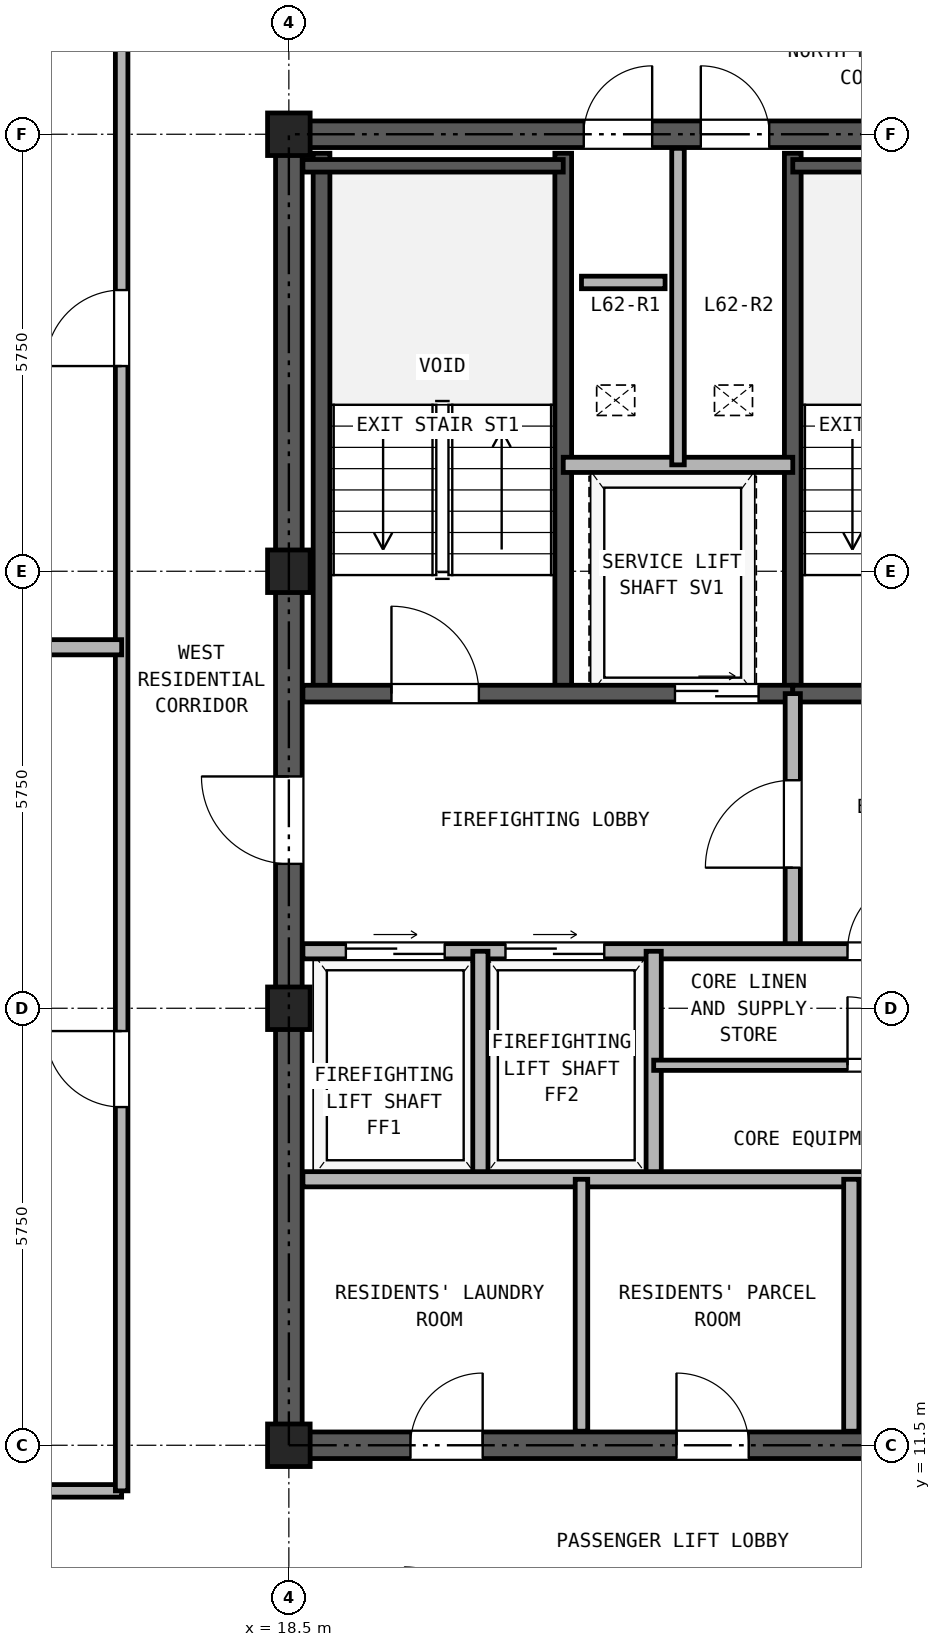
"""IFC4 building model, lengths in metres.
Left out: names, types, materials, properties, quantities, classifications, styles, units other than length and angle.
Written with IfcOpenShell. Run it as: python <this file> out.ifc"""

import sys

from ifc_helpers import new_model, si_unit, direction, frame, frame_2d, origin, origin_2d, place, context, subcontext, project, spatial, rectangle, hollow_rectangle, extrude, source, transform, mapped, element, fill, save


model = new_model("IFC4")
c1 = context("Model", 3, precision=1e-05, world=origin(), true_north=direction((0.0, 1.0)))
c2 = subcontext(c1, "Body", "Model", "MODEL_VIEW")
j1 = project(units=[si_unit("LENGTHUNIT", "METRE"), si_unit("PLANEANGLEUNIT", "RADIAN")], contexts=[c1])
p1 = place(None, origin())
s1 = spatial("IfcSite", under=j1, at=p1, CompositionType="ELEMENT")
p2 = place(p1, origin())
s2 = spatial("IfcBuilding", under=s1, at=p2, CompositionType="ELEMENT")
p3 = place(p2, frame((0.0, 0.0, 220.1)))
s3 = spatial("IfcBuildingStorey", under=s2, at=p3, CompositionType="ELEMENT", Elevation=220.1)
m1 = source(origin(), c2, "Body", "SweptSolid", [
    extrude(hollow_rectangle(XDim=0.56, YDim=0.56, WallThickness=0.03, at=origin_2d()), origin(), (0.0, 0.0, 1.0), 2.98),
])
for number, where, z_axis, x_axis in (
    (1, (18.5, 11.5, 0.0), (0.0, 0.0, 1.0), (1.0, 0.0, 0.0)),
    (2, (18.5, 17.25, 0.0), (0.0, 0.0, 1.0), (1.0, 0.0, 0.0)),
    (3, (18.5, 23.0, 0.0), (0.0, 0.0, 1.0), (1.0, 0.0, 0.0)),
    (4, (18.5, 28.75, 0.0), (0.0, 0.0, 1.0), (1.0, 0.0, 0.0)),
):
    element("IfcColumn", number, at=place(p3, frame(where, z_axis=z_axis, x_axis=x_axis)), inside=s3, PredefinedType="COLUMN", context=c2, shape_type="MappedRepresentation", body=[
        mapped(m1, transform((0.0, 0.0, 0.0), x_axis=(1.0, 0.0, 0.0), y_axis=(0.0, 1.0, 0.0), z_axis=(0.0, 0.0, 1.0), scale=1.0)),
    ])
p4 = place(p3, frame((18.325, 11.5, 0.0), z_axis=(0.0, 0.0, 1.0), x_axis=(1.0, 0.0, 0.0)))
e5 = element("IfcWall", 5, at=p4, inside=s3, PredefinedType="SHEAR", context=c2, shape_type="SweptSolid", body=[
    extrude(rectangle(XDim=10.35, YDim=0.35, at=frame_2d((5.175, 0.0))), origin(), (0.0, 0.0, 1.0), 2.98),
])
p5 = place(p4, frame((1.775, 0.0, 0.0)))
e6 = element("IfcOpeningElement", 6, at=p5, cuts=e5, PredefinedType="OPENING", context=c2, shape_type="SweptSolid", body=[
    extrude(rectangle(XDim=0.95, YDim=2.15, at=frame_2d((0.475, 1.075))), frame((0.0, 0.185, 0.0), z_axis=(0.0, -1.0, 0.0), x_axis=(1.0, 0.0, 0.0)), (0.0, 0.0, 1.0), 0.37),
])
p6 = place(p4, frame((5.275, 0.0, 0.0)))
e7 = element("IfcOpeningElement", 7, at=p6, cuts=e5, PredefinedType="OPENING", context=c2, shape_type="SweptSolid", body=[
    extrude(rectangle(XDim=0.95, YDim=2.15, at=frame_2d((0.475, 1.075))), frame((0.0, 0.185, 0.0), z_axis=(0.0, -1.0, 0.0), x_axis=(1.0, 0.0, 0.0)), (0.0, 0.0, 1.0), 0.37),
])
p7 = place(p4, frame((8.175, 0.0, 0.0)))
e8 = element("IfcOpeningElement", 8, at=p7, cuts=e5, PredefinedType="OPENING", context=c2, shape_type="SweptSolid", body=[
    extrude(rectangle(XDim=1.1, YDim=2.25, at=frame_2d((0.55, 1.125))), frame((0.0, 0.185, 0.0), z_axis=(0.0, -1.0, 0.0), x_axis=(1.0, 0.0, 0.0)), (0.0, 0.0, 1.0), 0.37),
])
p8 = place(p3, frame((18.325, 28.75, 0.0), z_axis=(0.0, 0.0, 1.0), x_axis=(1.0, 0.0, 0.0)))
e9 = element("IfcWall", 9, at=p8, inside=s3, PredefinedType="SHEAR", context=c2, shape_type="SweptSolid", body=[
    extrude(rectangle(XDim=10.35, YDim=0.35, at=frame_2d((5.175, 0.0))), origin(), (0.0, 0.0, 1.0), 2.98),
])
p9 = place(p8, frame((4.055, 0.0, 0.0)))
e10 = element("IfcOpeningElement", 10, at=p9, cuts=e9, PredefinedType="OPENING", context=c2, shape_type="SweptSolid", body=[
    extrude(rectangle(XDim=0.9, YDim=2.05, at=frame_2d((0.45, 1.025))), frame((0.0, 0.185, 0.0), z_axis=(0.0, -1.0, 0.0), x_axis=(1.0, 0.0, 0.0)), (0.0, 0.0, 1.0), 0.37),
])
p10 = place(p8, frame((5.595, 0.0, 0.0)))
e11 = element("IfcOpeningElement", 11, at=p10, cuts=e9, PredefinedType="OPENING", context=c2, shape_type="SweptSolid", body=[
    extrude(rectangle(XDim=0.9, YDim=2.05, at=frame_2d((0.45, 1.025))), frame((0.0, 0.185, 0.0), z_axis=(0.0, -1.0, 0.0), x_axis=(1.0, 0.0, 0.0)), (0.0, 0.0, 1.0), 0.37),
])
p11 = place(p3, frame((18.5, 11.675, 0.0), z_axis=(0.0, 0.0, 1.0), x_axis=(0.0, 1.0, 0.0)))
e12 = element("IfcWall", 12, at=p11, inside=s3, PredefinedType="SHEAR", context=c2, shape_type="SweptSolid", body=[
    extrude(rectangle(XDim=16.9, YDim=0.35, at=frame_2d((8.45, 0.0))), origin(), (0.0, 0.0, 1.0), 2.98),
])
p12 = place(p11, frame((7.475, 0.0, 0.0)))
e13 = element("IfcOpeningElement", 13, at=p12, cuts=e12, PredefinedType="OPENING", context=c2, shape_type="SweptSolid", body=[
    extrude(rectangle(XDim=1.15, YDim=2.2, at=frame_2d((0.575, 1.1))), frame((0.0, 0.185, 0.0), z_axis=(0.0, -1.0, 0.0), x_axis=(1.0, 0.0, 0.0)), (0.0, 0.0, 1.0), 0.37),
])
for number, where, z_axis, x_axis in (
    (14, (18.93, 21.39, 0.0), (0.0, 0.0, 1.0), (0.0, 1.0, 0.0)),
    (15, (22.11, 21.39, 0.0), (0.0, 0.0, 1.0), (0.0, 1.0, 0.0)),
    (16, (25.13, 21.39, 0.0), (0.0, 0.0, 1.0), (0.0, 1.0, 0.0)),
):
    element("IfcWall", number, at=place(p3, frame(where, z_axis=z_axis, x_axis=x_axis)), inside=s3, PredefinedType="SOLIDWALL", context=c2, shape_type="SweptSolid", body=[
        extrude(rectangle(XDim=7.11, YDim=0.22, at=frame_2d((3.555, 0.0))), origin(), (0.0, 0.0, 1.0), 2.98),
    ])
p13 = place(p3, frame((18.685, 28.335, 0.0), z_axis=(0.0, 0.0, 1.0), x_axis=(1.0, 0.0, 0.0)))
e17 = element("IfcWall", 17, at=p13, inside=s3, PredefinedType="PARTITIONING", context=c2, shape_type="SweptSolid", body=[
    extrude(rectangle(XDim=3.425, YDim=0.165, at=frame_2d((1.712, 0.0))), origin(), (0.0, 0.0, 1.0), 2.98),
])
p14 = place(p3, frame((25.13, 28.335, 0.0), z_axis=(0.0, 0.0, 1.0), x_axis=(1.0, 0.0, 0.0)))
e18 = element("IfcWall", 18, at=p14, inside=s3, PredefinedType="PARTITIONING", context=c2, shape_type="SweptSolid", body=[
    extrude(rectangle(XDim=3.185, YDim=0.165, at=frame_2d((1.593, 0.0))), origin(), (0.0, 0.0, 1.0), 2.98),
])
p15 = place(p3, frame((18.685, 21.39, 0.0), z_axis=(0.0, 0.0, 1.0), x_axis=(1.0, 0.0, 0.0)))
e19 = element("IfcWall", 19, at=p15, inside=s3, PredefinedType="SOLIDWALL", context=c2, shape_type="SweptSolid", body=[
    extrude(rectangle(XDim=6.445, YDim=0.22, at=frame_2d((3.222, 0.0))), origin(), (0.0, 0.0, 1.0), 2.98),
])
p16 = place(p15, frame((1.165, 0.0, 0.0)))
e20 = element("IfcOpeningElement", 20, at=p16, cuts=e19, PredefinedType="OPENING", context=c2, shape_type="SweptSolid", body=[
    extrude(rectangle(XDim=1.15, YDim=2.2, at=frame_2d((0.575, 1.1))), frame((0.0, 0.12, 0.0), z_axis=(0.0, -1.0, 0.0), x_axis=(1.0, 0.0, 0.0)), (0.0, 0.0, 1.0), 0.24),
])
p17 = place(p15, frame((4.895, 0.0, 0.0)))
e21 = element("IfcOpeningElement", 21, at=p17, cuts=e19, PredefinedType="OPENING", context=c2, shape_type="SweptSolid", body=[
    extrude(rectangle(XDim=1.1, YDim=2.25, at=frame_2d((0.55, 1.125))), frame((0.0, 0.12, 0.0), z_axis=(0.0, -1.0, 0.0), x_axis=(1.0, 0.0, 0.0)), (0.0, 0.0, 1.0), 0.24),
])
p18 = place(p3, frame((25.13, 21.39, 0.0), z_axis=(0.0, 0.0, 1.0), x_axis=(1.0, 0.0, 0.0)))
e22 = element("IfcWall", 22, at=p18, inside=s3, PredefinedType="SOLIDWALL", context=c2, shape_type="SweptSolid", body=[
    extrude(rectangle(XDim=3.185, YDim=0.22, at=frame_2d((1.593, 0.0))), origin(), (0.0, 0.0, 1.0), 2.98),
])
p19 = place(p18, frame((0.92, 0.0, 0.0)))
e23 = element("IfcOpeningElement", 23, at=p19, cuts=e22, PredefinedType="OPENING", context=c2, shape_type="SweptSolid", body=[
    extrude(rectangle(XDim=1.15, YDim=2.2, at=frame_2d((0.575, 1.1))), frame((0.0, 0.12, 0.0), z_axis=(0.0, -1.0, 0.0), x_axis=(1.0, 0.0, 0.0)), (0.0, 0.0, 1.0), 0.24),
])
p20 = place(p3, frame((22.11, 24.4, 0.0), z_axis=(0.0, 0.0, 1.0), x_axis=(1.0, 0.0, 0.0)))
e24 = element("IfcWall", 24, at=p20, inside=s3, PredefinedType="PARTITIONING", context=c2, shape_type="SweptSolid", body=[
    extrude(rectangle(XDim=3.02, YDim=0.2, at=frame_2d((1.51, 0.0))), origin(), (0.0, 0.0, 1.0), 2.98),
])
p21 = place(p3, frame((23.62, 24.4, 0.0), z_axis=(0.0, 0.0, 1.0), x_axis=(0.0, 1.0, 0.0)))
e25 = element("IfcWall", 25, at=p21, inside=s3, PredefinedType="PARTITIONING", context=c2, shape_type="SweptSolid", body=[
    extrude(rectangle(XDim=4.165, YDim=0.165, at=frame_2d((2.083, 0.0))), origin(), (0.0, 0.0, 1.0), 2.98),
])
p22 = place(p3, frame((25.13, 18.0, 0.0), z_axis=(0.0, 0.0, 1.0), x_axis=(0.0, 1.0, 0.0)))
e26 = element("IfcWall", 26, at=p22, inside=s3, PredefinedType="PARTITIONING", context=c2, shape_type="SweptSolid", body=[
    extrude(rectangle(XDim=3.39, YDim=0.2, at=frame_2d((1.695, 0.0))), origin(), (0.0, 0.0, 1.0), 2.98),
])
p23 = place(p22, frame((1.1, 0.0, 0.0)))
e27 = element("IfcOpeningElement", 27, at=p23, cuts=e26, PredefinedType="OPENING", context=c2, shape_type="SweptSolid", body=[
    extrude(rectangle(XDim=1.15, YDim=2.2, at=frame_2d((0.575, 1.1))), frame((0.0, 0.11, 0.0), z_axis=(0.0, -1.0, 0.0), x_axis=(1.0, 0.0, 0.0)), (0.0, 0.0, 1.0), 0.22),
])
p24 = place(p3, frame((18.685, 18.0, 0.0), z_axis=(0.0, 0.0, 1.0), x_axis=(1.0, 0.0, 0.0)))
e28 = element("IfcWall", 28, at=p24, inside=s3, PredefinedType="PARTITIONING", context=c2, shape_type="SweptSolid", body=[
    extrude(rectangle(XDim=9.63, YDim=0.2, at=frame_2d((4.815, 0.0))), origin(), (0.0, 0.0, 1.0), 2.98),
])
p25 = place(p24, frame((0.565, 0.0, 0.0)))
e29 = element("IfcOpeningElement", 29, at=p25, cuts=e28, PredefinedType="OPENING", context=c2, shape_type="SweptSolid", body=[
    extrude(rectangle(XDim=1.3, YDim=2.3, at=frame_2d((0.65, 1.15))), frame((0.0, 0.11, 0.0), z_axis=(0.0, -1.0, 0.0), x_axis=(1.0, 0.0, 0.0)), (0.0, 0.0, 1.0), 0.22),
])
p26 = place(p24, frame((2.665, 0.0, 0.0)))
e30 = element("IfcOpeningElement", 30, at=p26, cuts=e28, PredefinedType="OPENING", context=c2, shape_type="SweptSolid", body=[
    extrude(rectangle(XDim=1.3, YDim=2.3, at=frame_2d((0.65, 1.15))), frame((0.0, 0.11, 0.0), z_axis=(0.0, -1.0, 0.0), x_axis=(1.0, 0.0, 0.0)), (0.0, 0.0, 1.0), 0.22),
])
p27 = place(p24, frame((7.165, 0.0, 0.0)))
e31 = element("IfcOpeningElement", 31, at=p27, cuts=e28, PredefinedType="OPENING", context=c2, shape_type="SweptSolid", body=[
    extrude(rectangle(XDim=1.0, YDim=2.15, at=frame_2d((0.5, 1.075))), frame((0.0, 0.11, 0.0), z_axis=(0.0, -1.0, 0.0), x_axis=(1.0, 0.0, 0.0)), (0.0, 0.0, 1.0), 0.22),
])
for number, where, z_axis, x_axis in (
    (32, (21.02, 15.0, 0.0), (0.0, 0.0, 1.0), (0.0, 1.0, 0.0)),
    (33, (23.3, 15.0, 0.0), (0.0, 0.0, 1.0), (0.0, 1.0, 0.0)),
):
    element("IfcWall", number, at=place(p3, frame(where, z_axis=z_axis, x_axis=x_axis)), inside=s3, PredefinedType="PARTITIONING", context=c2, shape_type="SweptSolid", body=[
        extrude(rectangle(XDim=3.0, YDim=0.2, at=frame_2d((1.5, 0.0))), origin(), (0.0, 0.0, 1.0), 2.98),
    ])
p28 = place(p3, frame((18.685, 15.0, 0.0), z_axis=(0.0, 0.0, 1.0), x_axis=(1.0, 0.0, 0.0)))
e34 = element("IfcWall", 34, at=p28, inside=s3, PredefinedType="PARTITIONING", context=c2, shape_type="SweptSolid", body=[
    extrude(rectangle(XDim=9.63, YDim=0.2, at=frame_2d((4.815, 0.0))), origin(), (0.0, 0.0, 1.0), 2.98),
])
p29 = place(p3, frame((23.3, 16.5, 0.0), z_axis=(0.0, 0.0, 1.0), x_axis=(1.0, 0.0, 0.0)))
e35 = element("IfcWall", 35, at=p29, inside=s3, PredefinedType="PARTITIONING", context=c2, shape_type="SweptSolid", body=[
    extrude(rectangle(XDim=5.015, YDim=0.135, at=frame_2d((2.507, 0.0))), origin(), (0.0, 0.0, 1.0), 2.98),
])
p30 = place(p29, frame((2.55, 0.0, 0.0)))
e36 = element("IfcOpeningElement", 36, at=p30, cuts=e35, PredefinedType="OPENING", context=c2, shape_type="SweptSolid", body=[
    extrude(rectangle(XDim=0.9, YDim=2.05, at=frame_2d((0.45, 1.025))), frame((0.0, 0.077, 0.0), z_axis=(0.0, -1.0, 0.0), x_axis=(1.0, 0.0, 0.0)), (0.0, 0.0, 1.0), 0.155),
])
p31 = place(p3, frame((22.35, 11.685, 0.0), z_axis=(0.0, 0.0, 1.0), x_axis=(0.0, 1.0, 0.0)))
e37 = element("IfcWall", 37, at=p31, inside=s3, PredefinedType="PARTITIONING", context=c2, shape_type="SweptSolid", body=[
    extrude(rectangle(XDim=3.315, YDim=0.165, at=frame_2d((1.657, 0.0))), origin(), (0.0, 0.0, 1.0), 2.98),
])
p32 = place(p3, frame((25.9, 11.685, 0.0), z_axis=(0.0, 0.0, 1.0), x_axis=(0.0, 1.0, 0.0)))
e38 = element("IfcWall", 38, at=p32, inside=s3, PredefinedType="PARTITIONING", context=c2, shape_type="SweptSolid", body=[
    extrude(rectangle(XDim=3.315, YDim=0.2, at=frame_2d((1.657, 0.0))), origin(), (0.0, 0.0, 1.0), 2.98),
])
p33 = place(p3, frame((8.56, 10.9, 0.0), z_axis=(0.0, 0.0, 1.0), x_axis=(1.0, 0.0, 0.0)))
e39 = element("IfcWall", 39, at=p33, inside=s3, PredefinedType="PARTITIONING", context=c2, shape_type="SweptSolid", body=[
    extrude(rectangle(XDim=7.74, YDim=0.165, at=frame_2d((3.87, 0.0))), origin(), (0.0, 0.0, 1.0), 2.98),
])
p34 = place(p3, frame((16.3, 10.9, 0.0), z_axis=(0.0, 0.0, 1.0), x_axis=(0.0, 1.0, 0.0)))
e40 = element("IfcWall", 40, at=p34, inside=s3, PredefinedType="PARTITIONING", context=c2, shape_type="SweptSolid", body=[
    extrude(rectangle(XDim=24.24, YDim=0.165, at=frame_2d((12.12, 0.0))), origin(), (0.0, 0.0, 1.0), 2.98),
])
p35 = place(p34, frame((5.05, 0.0, 0.0)))
e41 = element("IfcOpeningElement", 41, at=p35, cuts=e40, PredefinedType="OPENING", context=c2, shape_type="SweptSolid", body=[
    extrude(rectangle(XDim=1.0, YDim=2.15, at=frame_2d((0.5, 1.075))), frame((0.0, 0.093, 0.0), z_axis=(0.0, -1.0, 0.0), x_axis=(1.0, 0.0, 0.0)), (0.0, 0.0, 1.0), 0.185),
])
p36 = place(p34, frame((14.8, 0.0, 0.0)))
e42 = element("IfcOpeningElement", 42, at=p36, cuts=e40, PredefinedType="OPENING", context=c2, shape_type="SweptSolid", body=[
    extrude(rectangle(XDim=1.0, YDim=2.15, at=frame_2d((0.5, 1.075))), frame((0.0, 0.093, 0.0), z_axis=(0.0, -1.0, 0.0), x_axis=(1.0, 0.0, 0.0)), (0.0, 0.0, 1.0), 0.185),
])
p37 = place(p3, frame((5.36, 22.0, 0.0), z_axis=(0.0, 0.0, 1.0), x_axis=(1.0, 0.0, 0.0)))
e43 = element("IfcWall", 43, at=p37, inside=s3, PredefinedType="PARTITIONING", context=c2, shape_type="SweptSolid", body=[
    extrude(rectangle(XDim=10.94, YDim=0.2, at=frame_2d((5.47, 0.0))), origin(), (0.0, 0.0, 1.0), 2.98),
])
p38 = place(p3, frame((22.35, 26.8, 0.0), z_axis=(0.0, 0.0, 1.0), x_axis=(1.0, 0.0, 0.0)))
e44 = element("IfcWall", 44, at=p38, inside=s3, PredefinedType="PARTITIONING", context=c2, shape_type="SweptSolid", body=[
    extrude(rectangle(XDim=1.1, YDim=0.165, at=frame_2d((0.55, 0.0))), origin(), (0.0, 0.0, 1.0), 2.98),
])
p39 = place(p16, frame((1.15, 0.0, 0.0), z_axis=(0.0, 0.0, 1.0), x_axis=(-1.0, 0.0, 0.0)))
e45 = element("IfcDoor", 45, at=p39, inside=s3, OperationType="SINGLE_SWING_LEFT", PredefinedType="DOOR", context=c2, shape_type="SweptSolid", body=[
    extrude(rectangle(XDim=1.15, YDim=2.2, at=frame_2d((0.575, 1.1))), frame((0.0, 0.025, 0.0), z_axis=(0.0, -1.0, 0.0), x_axis=(1.0, 0.0, 0.0)), (0.0, 0.0, 1.0), 0.05),
])
fill(e20, e45)
p40 = place(p17, frame((1.1, 0.0, 0.0), z_axis=(0.0, 0.0, 1.0), x_axis=(-1.0, 0.0, 0.0)))
e46 = element("IfcDoor", 46, at=p40, inside=s3, OperationType="DOUBLE_DOOR_SLIDING", PredefinedType="DOOR", context=c2, shape_type="SweptSolid", body=[
    extrude(rectangle(XDim=1.1, YDim=2.25, at=frame_2d((0.55, 1.125))), frame((0.0, 0.025, 0.0), z_axis=(0.0, -1.0, 0.0), x_axis=(1.0, 0.0, 0.0)), (0.0, 0.0, 1.0), 0.05),
])
fill(e21, e46)
p41 = place(p23, origin())
e47 = element("IfcDoor", 47, at=p41, inside=s3, OperationType="SINGLE_SWING_LEFT", PredefinedType="DOOR", context=c2, shape_type="SweptSolid", body=[
    extrude(rectangle(XDim=1.15, YDim=2.2, at=frame_2d((0.575, 1.1))), frame((0.0, 0.025, 0.0), z_axis=(0.0, -1.0, 0.0), x_axis=(1.0, 0.0, 0.0)), (0.0, 0.0, 1.0), 0.05),
])
fill(e27, e47)
p42 = place(p25, origin())
e48 = element("IfcDoor", 48, at=p42, inside=s3, OperationType="DOUBLE_DOOR_SLIDING", PredefinedType="DOOR", context=c2, shape_type="SweptSolid", body=[
    extrude(rectangle(XDim=1.3, YDim=2.3, at=frame_2d((0.65, 1.15))), frame((0.0, 0.025, 0.0), z_axis=(0.0, -1.0, 0.0), x_axis=(1.0, 0.0, 0.0)), (0.0, 0.0, 1.0), 0.05),
])
fill(e29, e48)
p43 = place(p26, origin())
e49 = element("IfcDoor", 49, at=p43, inside=s3, OperationType="DOUBLE_DOOR_SLIDING", PredefinedType="DOOR", context=c2, shape_type="SweptSolid", body=[
    extrude(rectangle(XDim=1.3, YDim=2.3, at=frame_2d((0.65, 1.15))), frame((0.0, 0.025, 0.0), z_axis=(0.0, -1.0, 0.0), x_axis=(1.0, 0.0, 0.0)), (0.0, 0.0, 1.0), 0.05),
])
fill(e30, e49)
p44 = place(p27, frame((1.0, 0.0, 0.0), z_axis=(0.0, 0.0, 1.0), x_axis=(-1.0, 0.0, 0.0)))
e50 = element("IfcDoor", 50, at=p44, inside=s3, OperationType="SINGLE_SWING_RIGHT", PredefinedType="DOOR", context=c2, shape_type="SweptSolid", body=[
    extrude(rectangle(XDim=1.0, YDim=2.15, at=frame_2d((0.5, 1.075))), frame((0.0, 0.025, 0.0), z_axis=(0.0, -1.0, 0.0), x_axis=(1.0, 0.0, 0.0)), (0.0, 0.0, 1.0), 0.05),
])
fill(e31, e50)
p45 = place(p30, frame((0.9, 0.0, 0.0), z_axis=(0.0, 0.0, 1.0), x_axis=(-1.0, 0.0, 0.0)))
e51 = element("IfcDoor", 51, at=p45, inside=s3, OperationType="SINGLE_SWING_LEFT", PredefinedType="DOOR", context=c2, shape_type="SweptSolid", body=[
    extrude(rectangle(XDim=0.9, YDim=2.05, at=frame_2d((0.45, 1.025))), frame((0.0, 0.025, 0.0), z_axis=(0.0, -1.0, 0.0), x_axis=(1.0, 0.0, 0.0)), (0.0, 0.0, 1.0), 0.05),
])
fill(e36, e51)
p46 = place(p12, frame((1.15, 0.0, 0.0), z_axis=(0.0, 0.0, 1.0), x_axis=(-1.0, 0.0, 0.0)))
e52 = element("IfcDoor", 52, at=p46, inside=s3, OperationType="SINGLE_SWING_RIGHT", PredefinedType="DOOR", context=c2, shape_type="SweptSolid", body=[
    extrude(rectangle(XDim=1.15, YDim=2.2, at=frame_2d((0.575, 1.1))), frame((0.0, 0.025, 0.0), z_axis=(0.0, -1.0, 0.0), x_axis=(1.0, 0.0, 0.0)), (0.0, 0.0, 1.0), 0.05),
])
fill(e13, e52)
p47 = place(p9, origin())
e53 = element("IfcDoor", 53, at=p47, inside=s3, OperationType="SINGLE_SWING_RIGHT", PredefinedType="DOOR", context=c2, shape_type="SweptSolid", body=[
    extrude(rectangle(XDim=0.9, YDim=2.05, at=frame_2d((0.45, 1.025))), frame((0.0, 0.025, 0.0), z_axis=(0.0, -1.0, 0.0), x_axis=(1.0, 0.0, 0.0)), (0.0, 0.0, 1.0), 0.05),
])
fill(e10, e53)
p48 = place(p10, origin())
e54 = element("IfcDoor", 54, at=p48, inside=s3, OperationType="SINGLE_SWING_LEFT", PredefinedType="DOOR", context=c2, shape_type="SweptSolid", body=[
    extrude(rectangle(XDim=0.9, YDim=2.05, at=frame_2d((0.45, 1.025))), frame((0.0, 0.025, 0.0), z_axis=(0.0, -1.0, 0.0), x_axis=(1.0, 0.0, 0.0)), (0.0, 0.0, 1.0), 0.05),
])
fill(e11, e54)
p49 = place(p5, frame((0.95, 0.0, 0.0), z_axis=(0.0, 0.0, 1.0), x_axis=(-1.0, 0.0, 0.0)))
e55 = element("IfcDoor", 55, at=p49, inside=s3, OperationType="SINGLE_SWING_RIGHT", PredefinedType="DOOR", context=c2, shape_type="SweptSolid", body=[
    extrude(rectangle(XDim=0.95, YDim=2.15, at=frame_2d((0.475, 1.075))), frame((0.0, 0.025, 0.0), z_axis=(0.0, -1.0, 0.0), x_axis=(1.0, 0.0, 0.0)), (0.0, 0.0, 1.0), 0.05),
])
fill(e6, e55)
p50 = place(p6, frame((0.95, 0.0, 0.0), z_axis=(0.0, 0.0, 1.0), x_axis=(-1.0, 0.0, 0.0)))
e56 = element("IfcDoor", 56, at=p50, inside=s3, OperationType="SINGLE_SWING_LEFT", PredefinedType="DOOR", context=c2, shape_type="SweptSolid", body=[
    extrude(rectangle(XDim=0.95, YDim=2.15, at=frame_2d((0.475, 1.075))), frame((0.0, 0.025, 0.0), z_axis=(0.0, -1.0, 0.0), x_axis=(1.0, 0.0, 0.0)), (0.0, 0.0, 1.0), 0.05),
])
fill(e7, e56)
p51 = place(p35, origin())
e57 = element("IfcDoor", 57, at=p51, inside=s3, OperationType="SINGLE_SWING_RIGHT", PredefinedType="DOOR", context=c2, shape_type="SweptSolid", body=[
    extrude(rectangle(XDim=1.0, YDim=2.15, at=frame_2d((0.5, 1.075))), frame((0.0, 0.025, 0.0), z_axis=(0.0, -1.0, 0.0), x_axis=(1.0, 0.0, 0.0)), (0.0, 0.0, 1.0), 0.05),
])
fill(e41, e57)
p52 = place(p36, origin())
e58 = element("IfcDoor", 58, at=p52, inside=s3, OperationType="SINGLE_SWING_LEFT", PredefinedType="DOOR", context=c2, shape_type="SweptSolid", body=[
    extrude(rectangle(XDim=1.0, YDim=2.15, at=frame_2d((0.5, 1.075))), frame((0.0, 0.025, 0.0), z_axis=(0.0, -1.0, 0.0), x_axis=(1.0, 0.0, 0.0)), (0.0, 0.0, 1.0), 0.05),
])
fill(e42, e58)
save(model, sys.argv[1])
